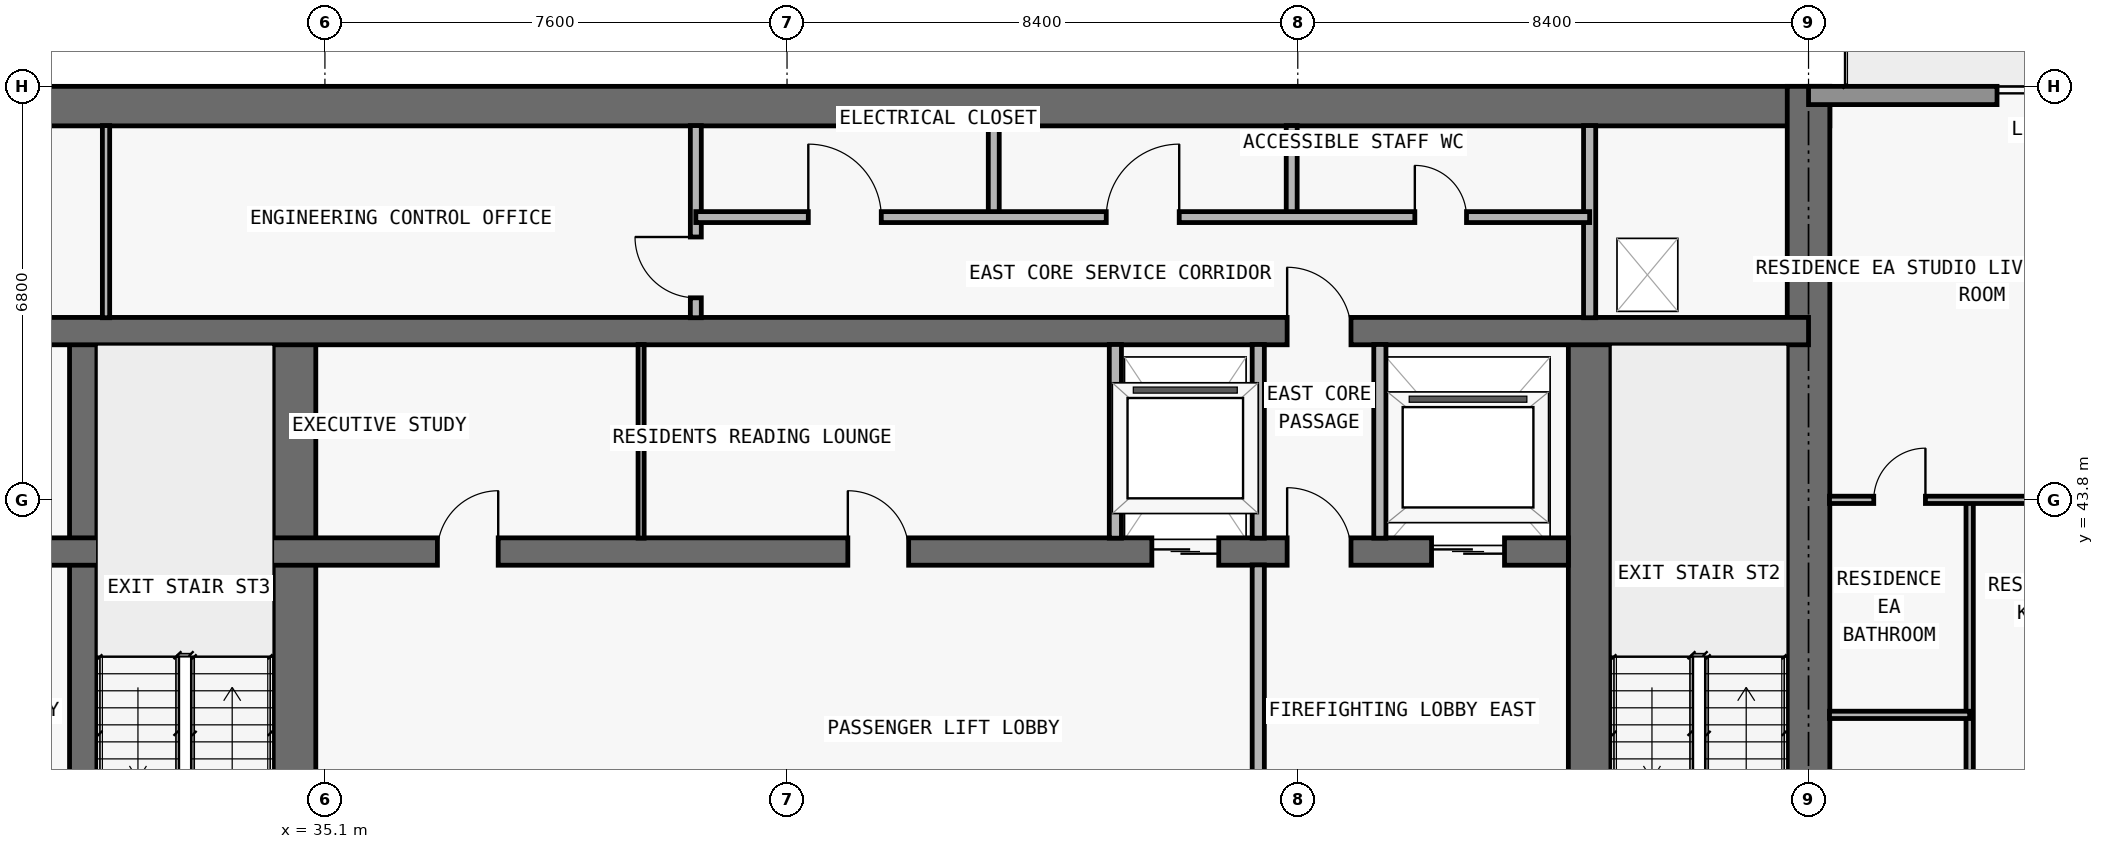
"""IFC4 building model, lengths in metres.
Left out: names, types, materials, properties, quantities, classifications, styles, units other than length and angle.
Written with IfcOpenShell. Run it as: python <this file> out.ifc"""

import sys

from ifc_helpers import new_model, si_unit, direction, frame, frame_2d, origin, place, context, subcontext, project, spatial, rectangle, extrude, element, fill, save


model = new_model("IFC4")
c1 = context("Model", 3, precision=1e-05, world=origin(), true_north=direction((0.0, 1.0)))
c2 = subcontext(c1, "Body", "Model", "MODEL_VIEW")
j1 = project(units=[si_unit("LENGTHUNIT", "METRE"), si_unit("PLANEANGLEUNIT", "RADIAN")], contexts=[c1])
p1 = place(None, origin())
s1 = spatial("IfcSite", under=j1, at=p1, CompositionType="ELEMENT")
p2 = place(p1, origin())
s2 = spatial("IfcBuilding", under=s1, at=p2, CompositionType="ELEMENT")
p3 = place(p2, frame((0.0, 0.0, 201.6)))
s3 = spatial("IfcBuildingStorey", under=s2, at=p3, CompositionType="ELEMENT", Elevation=201.6)
p4 = place(p3, frame((17.95, 50.275, 0.0), z_axis=(0.0, 0.0, 1.0), x_axis=(1.0, 0.0, 0.0)))
e1 = element("IfcWall", 1, at=p4, inside=s3, PredefinedType="SHEAR", context=c2, shape_type="SweptSolid", body=[
    extrude(rectangle(XDim=41.9, YDim=0.65, at=frame_2d((20.95, 0.0))), origin(), (0.0, 0.0, 1.0), 3.05),
])
p5 = place(p3, frame((59.5, 36.65, 0.0), z_axis=(0.0, 0.0, 1.0), x_axis=(0.0, 1.0, 0.0)))
e2 = element("IfcWall", 2, at=p5, inside=s3, PredefinedType="SHEAR", context=c2, shape_type="SweptSolid", body=[
    extrude(rectangle(XDim=13.95, YDim=0.7, at=frame_2d((6.975, 0.0))), origin(), (0.0, 0.0, 1.0), 3.05),
])
p6 = place(p3, frame((55.9, 37.0, 0.0), z_axis=(0.0, 0.0, 1.0), x_axis=(0.0, 1.0, 0.0)))
e3 = element("IfcWall", 3, at=p6, inside=s3, PredefinedType="SHEAR", context=c2, shape_type="SweptSolid", body=[
    extrude(rectangle(XDim=9.575, YDim=0.7, at=frame_2d((4.788, 0.0))), origin(), (0.0, 0.0, 1.0), 3.05),
])
p7 = place(p6, frame((0.55, 0.0, 0.0)))
e4 = element("IfcOpeningElement", 4, at=p7, cuts=e3, PredefinedType="OPENING", context=c2, shape_type="SweptSolid", body=[
    extrude(rectangle(XDim=1.1, YDim=2.15, at=frame_2d((0.55, 1.075))), frame((0.0, 0.36, 0.0), z_axis=(0.0, -1.0, 0.0), x_axis=(1.0, 0.0, 0.0)), (0.0, 0.0, 1.0), 0.72),
])
p8 = place(p3, frame((31.125, 37.0, 0.0), z_axis=(0.0, 0.0, 1.0), x_axis=(0.0, 1.0, 0.0)))
e5 = element("IfcWall", 5, at=p8, inside=s3, PredefinedType="SHEAR", context=c2, shape_type="SweptSolid", body=[
    extrude(rectangle(XDim=9.575, YDim=0.45, at=frame_2d((4.788, 0.0))), origin(), (0.0, 0.0, 1.0), 3.05),
])
p9 = place(p3, frame((34.6, 37.0, 0.0), z_axis=(0.0, 0.0, 1.0), x_axis=(0.0, 1.0, 0.0)))
e6 = element("IfcWall", 6, at=p9, inside=s3, PredefinedType="SHEAR", context=c2, shape_type="SweptSolid", body=[
    extrude(rectangle(XDim=9.575, YDim=0.7, at=frame_2d((4.788, 0.0))), origin(), (0.0, 0.0, 1.0), 3.05),
])
p10 = place(p3, frame((22.25, 42.95, 0.0), z_axis=(0.0, 0.0, 1.0), x_axis=(1.0, 0.0, 0.0)))
e7 = element("IfcWall", 7, at=p10, inside=s3, PredefinedType="SHEAR", context=c2, shape_type="SweptSolid", body=[
    extrude(rectangle(XDim=33.3, YDim=0.45, at=frame_2d((16.65, 0.0))), origin(), (0.0, 0.0, 1.0), 3.05),
])
p11 = place(p10, frame((1.05, 0.0, 0.0)))
e8 = element("IfcOpeningElement", 8, at=p11, cuts=e7, PredefinedType="OPENING", context=c2, shape_type="SweptSolid", body=[
    extrude(rectangle(XDim=1.2, YDim=2.2, at=frame_2d((0.6, 1.1))), frame((0.0, 0.235, 0.0), z_axis=(0.0, -1.0, 0.0), x_axis=(1.0, 0.0, 0.0)), (0.0, 0.0, 1.0), 0.47),
])
p12 = place(p10, frame((31.05, 0.0, 0.0)))
e9 = element("IfcOpeningElement", 9, at=p12, cuts=e7, PredefinedType="OPENING", context=c2, shape_type="SweptSolid", body=[
    extrude(rectangle(XDim=1.2, YDim=2.2, at=frame_2d((0.6, 1.1))), frame((0.0, 0.235, 0.0), z_axis=(0.0, -1.0, 0.0), x_axis=(1.0, 0.0, 0.0)), (0.0, 0.0, 1.0), 0.47),
])
p13 = place(p10, frame((26.45, 0.0, 0.0)))
e10 = element("IfcOpeningElement", 10, at=p13, cuts=e7, PredefinedType="OPENING", context=c2, shape_type="SweptSolid", body=[
    extrude(rectangle(XDim=1.1, YDim=2.2, at=frame_2d((0.55, 1.1))), frame((0.0, 0.235, 0.0), z_axis=(0.0, -1.0, 0.0), x_axis=(1.0, 0.0, 0.0)), (0.0, 0.0, 1.0), 0.47),
])
p14 = place(p10, frame((5.95, 0.0, 0.0)))
e11 = element("IfcOpeningElement", 11, at=p14, cuts=e7, PredefinedType="OPENING", context=c2, shape_type="SweptSolid", body=[
    extrude(rectangle(XDim=1.1, YDim=2.2, at=frame_2d((0.55, 1.1))), frame((0.0, 0.235, 0.0), z_axis=(0.0, -1.0, 0.0), x_axis=(1.0, 0.0, 0.0)), (0.0, 0.0, 1.0), 0.47),
])
p15 = place(p10, frame((3.625, 0.0, 0.0)))
e12 = element("IfcOpeningElement", 12, at=p15, cuts=e7, PredefinedType="OPENING", context=c2, shape_type="SweptSolid", body=[
    extrude(rectangle(XDim=1.05, YDim=2.15, at=frame_2d((0.525, 1.075))), frame((0.0, 0.235, 0.0), z_axis=(0.0, -1.0, 0.0), x_axis=(1.0, 0.0, 0.0)), (0.0, 0.0, 1.0), 0.47),
])
p16 = place(p10, frame((28.675, 0.0, 0.0)))
e13 = element("IfcOpeningElement", 13, at=p16, cuts=e7, PredefinedType="OPENING", context=c2, shape_type="SweptSolid", body=[
    extrude(rectangle(XDim=1.05, YDim=2.15, at=frame_2d((0.525, 1.075))), frame((0.0, 0.235, 0.0), z_axis=(0.0, -1.0, 0.0), x_axis=(1.0, 0.0, 0.0)), (0.0, 0.0, 1.0), 0.47),
])
p17 = place(p10, frame((14.7, 0.0, 0.0)))
e14 = element("IfcOpeningElement", 14, at=p17, cuts=e7, PredefinedType="OPENING", context=c2, shape_type="SweptSolid", body=[
    extrude(rectangle(XDim=1.0, YDim=2.2, at=frame_2d((0.5, 1.1))), frame((0.0, 0.235, 0.0), z_axis=(0.0, -1.0, 0.0), x_axis=(1.0, 0.0, 0.0)), (0.0, 0.0, 1.0), 0.47),
])
p18 = place(p10, frame((21.45, 0.0, 0.0)))
e15 = element("IfcOpeningElement", 15, at=p18, cuts=e7, PredefinedType="OPENING", context=c2, shape_type="SweptSolid", body=[
    extrude(rectangle(XDim=1.0, YDim=2.2, at=frame_2d((0.5, 1.1))), frame((0.0, 0.235, 0.0), z_axis=(0.0, -1.0, 0.0), x_axis=(1.0, 0.0, 0.0)), (0.0, 0.0, 1.0), 0.47),
])
p19 = place(p3, frame((18.3, 46.575, 0.0), z_axis=(0.0, 0.0, 1.0), x_axis=(1.0, 0.0, 0.0)))
e16 = element("IfcWall", 16, at=p19, inside=s3, PredefinedType="SHEAR", context=c2, shape_type="SweptSolid", body=[
    extrude(rectangle(XDim=41.2, YDim=0.45, at=frame_2d((20.6, 0.0))), origin(), (0.0, 0.0, 1.0), 3.05),
])
p20 = place(p19, frame((7.6, 0.0, 0.0)))
e17 = element("IfcOpeningElement", 17, at=p20, cuts=e16, PredefinedType="OPENING", context=c2, shape_type="SweptSolid", body=[
    extrude(rectangle(XDim=1.0, YDim=2.2, at=frame_2d((0.5, 1.1))), frame((0.0, 0.235, 0.0), z_axis=(0.0, -1.0, 0.0), x_axis=(1.0, 0.0, 0.0)), (0.0, 0.0, 1.0), 0.47),
])
p21 = place(p19, frame((32.625, 0.0, 0.0)))
e18 = element("IfcOpeningElement", 18, at=p21, cuts=e16, PredefinedType="OPENING", context=c2, shape_type="SweptSolid", body=[
    extrude(rectangle(XDim=1.05, YDim=2.15, at=frame_2d((0.525, 1.075))), frame((0.0, 0.235, 0.0), z_axis=(0.0, -1.0, 0.0), x_axis=(1.0, 0.0, 0.0)), (0.0, 0.0, 1.0), 0.47),
])
p22 = place(p3, frame((59.5, 50.45, 0.0), z_axis=(0.0, 0.0, 1.0), x_axis=(1.0, 0.0, 0.0)))
e19 = element("IfcWall", 19, at=p22, inside=s3, PredefinedType="STANDARD", context=c2, shape_type="SweptSolid", body=[
    extrude(rectangle(XDim=8.2, YDim=0.3, at=frame_2d((4.1, 0.0))), origin(), (0.0, 0.0, 1.0), 3.05),
])
p23 = place(p22, frame((3.1, 0.0, 0.0)))
e20 = element("IfcOpeningElement", 20, at=p23, cuts=e19, PredefinedType="OPENING", context=c2, shape_type="SweptSolid", body=[
    extrude(rectangle(XDim=2.0, YDim=2.3, at=frame_2d((1.0, 1.15))), frame((0.0, 0.16, 0.0), z_axis=(0.0, -1.0, 0.0), x_axis=(1.0, 0.0, 0.0)), (0.0, 0.0, 1.0), 0.32),
])
p24 = place(p3, frame((31.5, 46.795, 0.0), z_axis=(0.0, 0.0, 1.0), x_axis=(0.0, 1.0, 0.0)))
e21 = element("IfcWall", 21, at=p24, inside=s3, PredefinedType="PARTITIONING", context=c2, shape_type="SweptSolid", body=[
    extrude(rectangle(XDim=3.16, YDim=0.12, at=frame_2d((1.58, 0.0))), origin(), (0.0, 0.0, 1.0), 3.05),
])
p25 = place(p3, frame((40.3, 43.17, 0.0), z_axis=(0.0, 0.0, 1.0), x_axis=(0.0, 1.0, 0.0)))
e22 = element("IfcWall", 22, at=p25, inside=s3, PredefinedType="MOVABLE", context=c2, shape_type="SweptSolid", body=[
    extrude(rectangle(XDim=3.185, YDim=0.1, at=frame_2d((1.593, 0.0))), origin(), (0.0, 0.0, 1.0), 3.05),
])
p26 = place(p3, frame((41.2, 46.795, 0.0), z_axis=(0.0, 0.0, 1.0), x_axis=(0.0, 1.0, 0.0)))
e23 = element("IfcWall", 23, at=p26, inside=s3, PredefinedType="PARTITIONING", context=c2, shape_type="SweptSolid", body=[
    extrude(rectangle(XDim=3.16, YDim=0.18, at=frame_2d((1.58, 0.0))), origin(), (0.0, 0.0, 1.0), 3.05),
])
p27 = place(p26, frame((0.327, 0.0, 0.0)))
e24 = element("IfcOpeningElement", 24, at=p27, cuts=e23, PredefinedType="OPENING", context=c2, shape_type="SweptSolid", body=[
    extrude(rectangle(XDim=1.0, YDim=2.2, at=frame_2d((0.5, 1.1))), frame((0.0, 0.1, 0.0), z_axis=(0.0, -1.0, 0.0), x_axis=(1.0, 0.0, 0.0)), (0.0, 0.0, 1.0), 0.2),
])
p28 = place(p3, frame((46.1, 48.45, 0.0), z_axis=(0.0, 0.0, 1.0), x_axis=(0.0, 1.0, 0.0)))
e25 = element("IfcWall", 25, at=p28, inside=s3, PredefinedType="PARTITIONING", context=c2, shape_type="SweptSolid", body=[
    extrude(rectangle(XDim=1.505, YDim=0.18, at=frame_2d((0.752, 0.0))), origin(), (0.0, 0.0, 1.0), 3.05),
])
p29 = place(p3, frame((48.1, 43.17, 0.0), z_axis=(0.0, 0.0, 1.0), x_axis=(0.0, 1.0, 0.0)))
e26 = element("IfcWall", 26, at=p29, inside=s3, PredefinedType="PARTITIONING", context=c2, shape_type="SweptSolid", body=[
    extrude(rectangle(XDim=3.185, YDim=0.2, at=frame_2d((1.593, 0.0))), origin(), (0.0, 0.0, 1.0), 3.05),
])
p30 = place(p3, frame((50.45, 37.345, 0.0), z_axis=(0.0, 0.0, 1.0), x_axis=(0.0, 1.0, 0.0)))
e27 = element("IfcWall", 27, at=p30, inside=s3, PredefinedType="PARTITIONING", context=c2, shape_type="SweptSolid", body=[
    extrude(rectangle(XDim=5.385, YDim=0.2, at=frame_2d((2.692, 0.0))), origin(), (0.0, 0.0, 1.0), 3.05),
])
p31 = place(p3, frame((50.45, 43.17, 0.0), z_axis=(0.0, 0.0, 1.0), x_axis=(0.0, 1.0, 0.0)))
e28 = element("IfcWall", 28, at=p31, inside=s3, PredefinedType="PARTITIONING", context=c2, shape_type="SweptSolid", body=[
    extrude(rectangle(XDim=3.185, YDim=0.2, at=frame_2d((1.593, 0.0))), origin(), (0.0, 0.0, 1.0), 3.05),
])
p32 = place(p3, frame((51.0, 48.45, 0.0), z_axis=(0.0, 0.0, 1.0), x_axis=(0.0, 1.0, 0.0)))
e29 = element("IfcWall", 29, at=p32, inside=s3, PredefinedType="PARTITIONING", context=c2, shape_type="SweptSolid", body=[
    extrude(rectangle(XDim=1.505, YDim=0.18, at=frame_2d((0.752, 0.0))), origin(), (0.0, 0.0, 1.0), 3.05),
])
p33 = place(p3, frame((52.45, 43.17, 0.0), z_axis=(0.0, 0.0, 1.0), x_axis=(0.0, 1.0, 0.0)))
e30 = element("IfcWall", 30, at=p33, inside=s3, PredefinedType="PARTITIONING", context=c2, shape_type="SweptSolid", body=[
    extrude(rectangle(XDim=3.185, YDim=0.2, at=frame_2d((1.593, 0.0))), origin(), (0.0, 0.0, 1.0), 3.05),
])
p34 = place(p3, frame((55.9, 46.795, 0.0), z_axis=(0.0, 0.0, 1.0), x_axis=(0.0, 1.0, 0.0)))
e31 = element("IfcWall", 31, at=p34, inside=s3, PredefinedType="PARTITIONING", context=c2, shape_type="SweptSolid", body=[
    extrude(rectangle(XDim=3.16, YDim=0.2, at=frame_2d((1.58, 0.0))), origin(), (0.0, 0.0, 1.0), 3.05),
])
p35 = place(p3, frame((62.15, 37.0, 0.0), z_axis=(0.0, 0.0, 1.0), x_axis=(0.0, 1.0, 0.0)))
e32 = element("IfcWall", 32, at=p35, inside=s3, PredefinedType="PARTITIONING", context=c2, shape_type="SweptSolid", body=[
    extrude(rectangle(XDim=6.8, YDim=0.12, at=frame_2d((3.4, 0.0))), origin(), (0.0, 0.0, 1.0), 2.578),
])
p36 = place(p35, frame((1.207, 0.0, 0.0)))
e33 = element("IfcOpeningElement", 33, at=p36, cuts=e32, PredefinedType="OPENING", context=c2, shape_type="SweptSolid", body=[
    extrude(rectangle(XDim=0.85, YDim=2.1, at=frame_2d((0.425, 1.05))), frame((0.0, 0.07, 0.0), z_axis=(0.0, -1.0, 0.0), x_axis=(1.0, 0.0, 0.0)), (0.0, 0.0, 1.0), 0.14),
])
p37 = place(p3, frame((59.845, 40.264, 0.0), z_axis=(0.0, 0.0, 1.0), x_axis=(1.0, 0.0, 0.0)))
e34 = element("IfcWall", 34, at=p37, inside=s3, PredefinedType="PARTITIONING", context=c2, shape_type="SweptSolid", body=[
    extrude(rectangle(XDim=2.305, YDim=0.12, at=frame_2d((1.152, 0.0))), origin(), (0.0, 0.0, 1.0), 3.05),
])
p38 = place(p3, frame((59.845, 43.8, 0.0), z_axis=(0.0, 0.0, 1.0), x_axis=(1.0, 0.0, 0.0)))
e35 = element("IfcWall", 35, at=p38, inside=s3, PredefinedType="PARTITIONING", context=c2, shape_type="SweptSolid", body=[
    extrude(rectangle(XDim=11.56, YDim=0.12, at=frame_2d((5.78, 0.0))), origin(), (0.0, 0.0, 1.0), 2.418),
])
p39 = place(p38, frame((3.409, 0.0, 0.0)))
e36 = element("IfcOpeningElement", 36, at=p39, cuts=e35, PredefinedType="OPENING", context=c2, shape_type="SweptSolid", body=[
    extrude(rectangle(XDim=0.9, YDim=2.15, at=frame_2d((0.45, 1.075))), frame((0.0, 0.07, 0.0), z_axis=(0.0, -1.0, 0.0), x_axis=(1.0, 0.0, 0.0)), (0.0, 0.0, 1.0), 0.14),
])
p40 = place(p38, frame((0.728, 0.0, 0.0)))
e37 = element("IfcOpeningElement", 37, at=p40, cuts=e35, PredefinedType="OPENING", context=c2, shape_type="SweptSolid", body=[
    extrude(rectangle(XDim=0.85, YDim=2.1, at=frame_2d((0.425, 1.05))), frame((0.0, 0.07, 0.0), z_axis=(0.0, -1.0, 0.0), x_axis=(1.0, 0.0, 0.0)), (0.0, 0.0, 1.0), 0.14),
])
p41 = place(p3, frame((41.2, 48.45, 0.0), z_axis=(0.0, 0.0, 1.0), x_axis=(1.0, 0.0, 0.0)))
e38 = element("IfcWall", 38, at=p41, inside=s3, PredefinedType="PARTITIONING", context=c2, shape_type="SweptSolid", body=[
    extrude(rectangle(XDim=14.7, YDim=0.18, at=frame_2d((7.35, 0.0))), origin(), (0.0, 0.0, 1.0), 3.05),
])
p42 = place(p41, frame((1.85, 0.0, 0.0)))
e39 = element("IfcOpeningElement", 39, at=p42, cuts=e38, PredefinedType="OPENING", context=c2, shape_type="SweptSolid", body=[
    extrude(rectangle(XDim=1.2, YDim=2.2, at=frame_2d((0.6, 1.1))), frame((0.0, 0.1, 0.0), z_axis=(0.0, -1.0, 0.0), x_axis=(1.0, 0.0, 0.0)), (0.0, 0.0, 1.0), 0.2),
])
p43 = place(p41, frame((6.75, 0.0, 0.0)))
e40 = element("IfcOpeningElement", 40, at=p43, cuts=e38, PredefinedType="OPENING", context=c2, shape_type="SweptSolid", body=[
    extrude(rectangle(XDim=1.2, YDim=2.2, at=frame_2d((0.6, 1.1))), frame((0.0, 0.1, 0.0), z_axis=(0.0, -1.0, 0.0), x_axis=(1.0, 0.0, 0.0)), (0.0, 0.0, 1.0), 0.2),
])
p44 = place(p41, frame((11.825, 0.0, 0.0)))
e41 = element("IfcOpeningElement", 41, at=p44, cuts=e38, PredefinedType="OPENING", context=c2, shape_type="SweptSolid", body=[
    extrude(rectangle(XDim=0.85, YDim=2.1, at=frame_2d((0.425, 1.05))), frame((0.0, 0.1, 0.0), z_axis=(0.0, -1.0, 0.0), x_axis=(1.0, 0.0, 0.0)), (0.0, 0.0, 1.0), 0.2),
])
p45 = place(p23, origin())
e42 = element("IfcDoor", 42, at=p45, inside=s3, OperationType="DOUBLE_DOOR_SLIDING", PredefinedType="DOOR", context=c2, shape_type="SweptSolid", body=[
    extrude(rectangle(XDim=2.0, YDim=2.3, at=frame_2d((1.0, 1.15))), frame((0.0, 0.025, 0.0), z_axis=(0.0, -1.0, 0.0), x_axis=(1.0, 0.0, 0.0)), (0.0, 0.0, 1.0), 0.05),
])
fill(e20, e42)
p46 = place(p12, origin())
e43 = element("IfcDoor", 43, at=p46, inside=s3, OperationType="DOUBLE_DOOR_SLIDING", PredefinedType="DOOR", context=c2, shape_type="SweptSolid", body=[
    extrude(rectangle(XDim=1.2, YDim=2.2, at=frame_2d((0.6, 1.1))), frame((0.0, 0.025, 0.0), z_axis=(0.0, -1.0, 0.0), x_axis=(1.0, 0.0, 0.0)), (0.0, 0.0, 1.0), 0.05),
])
fill(e9, e43)
p47 = place(p13, origin())
e44 = element("IfcDoor", 44, at=p47, inside=s3, OperationType="DOUBLE_DOOR_SLIDING", PredefinedType="DOOR", context=c2, shape_type="SweptSolid", body=[
    extrude(rectangle(XDim=1.1, YDim=2.2, at=frame_2d((0.55, 1.1))), frame((0.0, 0.025, 0.0), z_axis=(0.0, -1.0, 0.0), x_axis=(1.0, 0.0, 0.0)), (0.0, 0.0, 1.0), 0.05),
])
fill(e10, e44)
p48 = place(p16, origin())
e45 = element("IfcDoor", 45, at=p48, inside=s3, OperationType="SINGLE_SWING_LEFT", PredefinedType="DOOR", context=c2, shape_type="SweptSolid", body=[
    extrude(rectangle(XDim=1.05, YDim=2.15, at=frame_2d((0.525, 1.075))), frame((0.0, 0.025, 0.0), z_axis=(0.0, -1.0, 0.0), x_axis=(1.0, 0.0, 0.0)), (0.0, 0.0, 1.0), 0.05),
])
fill(e13, e45)
p49 = place(p17, origin())
e46 = element("IfcDoor", 46, at=p49, inside=s3, OperationType="SINGLE_SWING_RIGHT", PredefinedType="DOOR", context=c2, shape_type="SweptSolid", body=[
    extrude(rectangle(XDim=1.0, YDim=2.2, at=frame_2d((0.5, 1.1))), frame((0.0, 0.025, 0.0), z_axis=(0.0, -1.0, 0.0), x_axis=(1.0, 0.0, 0.0)), (0.0, 0.0, 1.0), 0.05),
])
fill(e14, e46)
p50 = place(p18, origin())
e47 = element("IfcDoor", 47, at=p50, inside=s3, OperationType="SINGLE_SWING_LEFT", PredefinedType="DOOR", context=c2, shape_type="SweptSolid", body=[
    extrude(rectangle(XDim=1.0, YDim=2.2, at=frame_2d((0.5, 1.1))), frame((0.0, 0.025, 0.0), z_axis=(0.0, -1.0, 0.0), x_axis=(1.0, 0.0, 0.0)), (0.0, 0.0, 1.0), 0.05),
])
fill(e15, e47)
p51 = place(p21, origin())
e48 = element("IfcDoor", 48, at=p51, inside=s3, OperationType="SINGLE_SWING_LEFT", PredefinedType="DOOR", context=c2, shape_type="SweptSolid", body=[
    extrude(rectangle(XDim=1.05, YDim=2.15, at=frame_2d((0.525, 1.075))), frame((0.0, 0.025, 0.0), z_axis=(0.0, -1.0, 0.0), x_axis=(1.0, 0.0, 0.0)), (0.0, 0.0, 1.0), 0.05),
])
fill(e18, e48)
p52 = place(p27, origin())
e49 = element("IfcDoor", 49, at=p52, inside=s3, OperationType="SINGLE_SWING_RIGHT", PredefinedType="DOOR", context=c2, shape_type="SweptSolid", body=[
    extrude(rectangle(XDim=1.0, YDim=2.2, at=frame_2d((0.5, 1.1))), frame((0.0, 0.025, 0.0), z_axis=(0.0, -1.0, 0.0), x_axis=(1.0, 0.0, 0.0)), (0.0, 0.0, 1.0), 0.05),
])
fill(e24, e49)
p53 = place(p42, origin())
e50 = element("IfcDoor", 50, at=p53, inside=s3, OperationType="SINGLE_SWING_LEFT", PredefinedType="DOOR", context=c2, shape_type="SweptSolid", body=[
    extrude(rectangle(XDim=1.2, YDim=2.2, at=frame_2d((0.6, 1.1))), frame((0.0, 0.025, 0.0), z_axis=(0.0, -1.0, 0.0), x_axis=(1.0, 0.0, 0.0)), (0.0, 0.0, 1.0), 0.05),
])
fill(e39, e50)
p54 = place(p43, origin())
e51 = element("IfcDoor", 51, at=p54, inside=s3, OperationType="SINGLE_SWING_RIGHT", PredefinedType="DOOR", context=c2, shape_type="SweptSolid", body=[
    extrude(rectangle(XDim=1.2, YDim=2.2, at=frame_2d((0.6, 1.1))), frame((0.0, 0.025, 0.0), z_axis=(0.0, -1.0, 0.0), x_axis=(1.0, 0.0, 0.0)), (0.0, 0.0, 1.0), 0.05),
])
fill(e40, e51)
p55 = place(p44, origin())
e52 = element("IfcDoor", 52, at=p55, inside=s3, OperationType="SINGLE_SWING_LEFT", PredefinedType="DOOR", context=c2, shape_type="SweptSolid", body=[
    extrude(rectangle(XDim=0.85, YDim=2.1, at=frame_2d((0.425, 1.05))), frame((0.0, 0.025, 0.0), z_axis=(0.0, -1.0, 0.0), x_axis=(1.0, 0.0, 0.0)), (0.0, 0.0, 1.0), 0.05),
])
fill(e41, e52)
p56 = place(p40, origin())
e53 = element("IfcDoor", 53, at=p56, inside=s3, OperationType="SINGLE_SWING_RIGHT", PredefinedType="DOOR", context=c2, shape_type="SweptSolid", body=[
    extrude(rectangle(XDim=0.85, YDim=2.1, at=frame_2d((0.425, 1.05))), frame((0.0, 0.025, 0.0), z_axis=(0.0, -1.0, 0.0), x_axis=(1.0, 0.0, 0.0)), (0.0, 0.0, 1.0), 0.05),
])
fill(e37, e53)
save(model, sys.argv[1])
